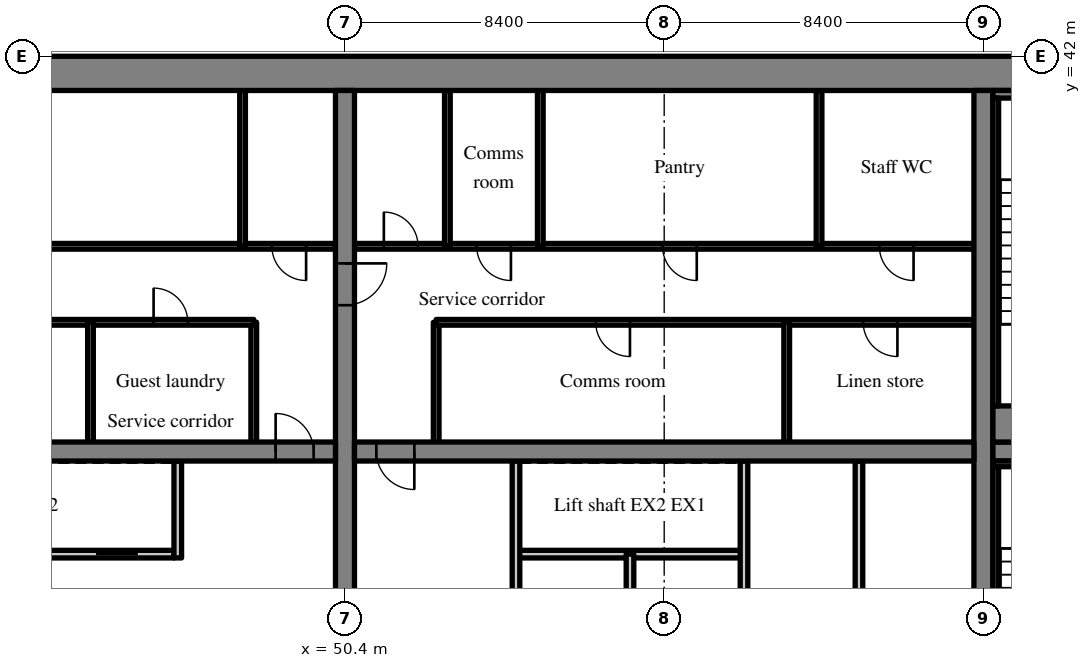
"""IFC4 building model, lengths in metres.
Left out: names, types, materials, properties, quantities, classifications, styles, units other than length and angle.
Written with IfcOpenShell. Run it as: python <this file> out.ifc"""

import sys

from ifc_helpers import new_model, si_unit, direction, frame, frame_2d, origin, place, context, subcontext, project, spatial, rectangle, extrude, source, transform, mapped, element, fill, save


model = new_model("IFC4")
c1 = context("Model", 3, precision=1e-05, world=origin(), true_north=direction((0.0, 1.0)))
c2 = subcontext(c1, "Body", "Model", "MODEL_VIEW")
j1 = project(units=[si_unit("LENGTHUNIT", "METRE"), si_unit("PLANEANGLEUNIT", "RADIAN")], contexts=[c1])
p1 = place(None, origin())
s1 = spatial("IfcSite", under=j1, at=p1, CompositionType="ELEMENT")
p2 = place(p1, origin())
s2 = spatial("IfcBuilding", under=s1, at=p2, CompositionType="ELEMENT")
p3 = place(p2, frame((0.0, 0.0, 114.2)))
s3 = spatial("IfcBuildingStorey", under=s2, at=p3, CompositionType="ELEMENT", Elevation=114.2)
m1 = source(origin(), c2, "Body", "SweptSolid", [
    extrude(rectangle(XDim=50.4, YDim=0.9, at=frame_2d((25.2, 0.0))), origin(), (0.0, 0.0, 1.0), 3.52),
])
p4 = place(p3, frame((25.2, 41.55, 0.0), z_axis=(0.0, 0.0, 1.0), x_axis=(1.0, 0.0, 0.0)))
e1 = element("IfcWall", 1, at=p4, inside=s3, PredefinedType="SHEAR", context=c2, shape_type="MappedRepresentation", body=[
    mapped(m1, transform((0.0, 0.0, 0.0), scale=1.0)),
])
m2 = source(origin(), c2, "Body", "SweptSolid", [
    extrude(rectangle(XDim=18.2, YDim=0.5, at=frame_2d((9.1, 0.0))), origin(), (0.0, 0.0, 1.0), 3.52),
])
p5 = place(p3, frame((50.4, 22.9, 0.0), z_axis=(0.0, 0.0, 1.0), x_axis=(0.0, 1.0, 0.0)))
e2 = element("IfcWall", 2, at=p5, inside=s3, PredefinedType="SHEAR", context=c2, shape_type="MappedRepresentation", body=[
    mapped(m2, transform((0.0, 0.0, 0.0), scale=1.0)),
])
m3 = source(origin(), c2, "Body", "SweptSolid", [
    extrude(rectangle(XDim=1.1, YDim=2.1, at=frame_2d((0.55, 1.05))), frame((0.0, 0.26, 0.0), z_axis=(0.0, -1.0, 0.0), x_axis=(1.0, 0.0, 0.0)), (0.0, 0.0, 1.0), 0.52),
])
p6 = place(p5, frame((12.55, 0.0, 0.0)))
e3 = element("IfcOpeningElement", 3, at=p6, cuts=e2, PredefinedType="OPENING", context=c2, shape_type="MappedRepresentation", body=[
    mapped(m3, transform((0.0, 0.0, 0.0), scale=1.0)),
])
p7 = place(p3, frame((67.2, 22.9, 0.0), z_axis=(0.0, 0.0, 1.0), x_axis=(0.0, 1.0, 0.0)))
e4 = element("IfcWall", 4, at=p7, inside=s3, PredefinedType="SHEAR", context=c2, shape_type="MappedRepresentation", body=[
    mapped(m2, transform((0.0, 0.0, 0.0), scale=1.0)),
])
m4 = source(origin(), c2, "Body", "SweptSolid", [
    extrude(rectangle(XDim=16.3, YDim=0.5, at=frame_2d((8.15, 0.0))), origin(), (0.0, 0.0, 1.0), 3.52),
])
p8 = place(p3, frame((33.85, 31.6, 0.0), z_axis=(0.0, 0.0, 1.0), x_axis=(1.0, 0.0, 0.0)))
e5 = element("IfcWall", 5, at=p8, inside=s3, PredefinedType="SHEAR", context=c2, shape_type="MappedRepresentation", body=[
    mapped(m4, transform((0.0, 0.0, 0.0), scale=1.0)),
])
m5 = source(origin(), c2, "Body", "SweptSolid", [
    extrude(rectangle(XDim=1.0, YDim=2.1, at=frame_2d((0.5, 1.05))), frame((0.0, 0.26, 0.0), z_axis=(0.0, -1.0, 0.0), x_axis=(1.0, 0.0, 0.0)), (0.0, 0.0, 1.0), 0.52),
])
p9 = place(p8, frame((14.725, 0.0, 0.0)))
e6 = element("IfcOpeningElement", 6, at=p9, cuts=e5, PredefinedType="OPENING", context=c2, shape_type="MappedRepresentation", body=[
    mapped(m5, transform((0.0, 0.0, 0.0), scale=1.0)),
])
m6 = source(origin(), c2, "Body", "SweptSolid", [
    extrude(rectangle(XDim=16.3, YDim=0.5, at=frame_2d((8.15, 0.0))), origin(), (0.0, 0.0, 1.0), 3.52),
])
p10 = place(p3, frame((50.65, 31.6, 0.0), z_axis=(0.0, 0.0, 1.0), x_axis=(1.0, 0.0, 0.0)))
e7 = element("IfcWall", 7, at=p10, inside=s3, PredefinedType="SHEAR", context=c2, shape_type="MappedRepresentation", body=[
    mapped(m6, transform((0.0, 0.0, 0.0), scale=1.0)),
])
p11 = place(p10, frame((0.575, 0.0, 0.0)))
e8 = element("IfcOpeningElement", 8, at=p11, cuts=e7, PredefinedType="OPENING", context=c2, shape_type="MappedRepresentation", body=[
    mapped(m5, transform((0.0, 0.0, 0.0), scale=1.0)),
])
m7 = source(origin(), c2, "Body", "SweptSolid", [
    extrude(rectangle(XDim=7.25, YDim=0.5, at=frame_2d((3.625, 0.0))), origin(), (0.0, 0.0, 1.0), 3.52),
])
p12 = place(p3, frame((67.45, 31.6, 0.0), z_axis=(0.0, 0.0, 1.0), x_axis=(1.0, 0.0, 0.0)))
e9 = element("IfcWall", 9, at=p12, inside=s3, PredefinedType="SHEAR", context=c2, shape_type="MappedRepresentation", body=[
    mapped(m7, transform((0.0, 0.0, 0.0), scale=1.0)),
])
p13 = place(p12, frame((5.575, 0.0, 0.0)))
e10 = element("IfcOpeningElement", 10, at=p13, cuts=e9, PredefinedType="OPENING", context=c2, shape_type="MappedRepresentation", body=[
    mapped(m3, transform((0.0, 0.0, 0.0), scale=1.0)),
])
m8 = source(origin(), c2, "Body", "SweptSolid", [
    extrude(rectangle(XDim=12.05, YDim=0.2, at=frame_2d((6.025, 0.0))), origin(), (0.0, 0.0, 1.0), 3.52),
])
p14 = place(p3, frame((33.85, 28.9, 0.0), z_axis=(0.0, 0.0, 1.0), x_axis=(1.0, 0.0, 0.0)))
e11 = element("IfcWall", 11, at=p14, inside=s3, PredefinedType="SOLIDWALL", context=c2, shape_type="MappedRepresentation", body=[
    mapped(m8, transform((0.0, 0.0, 0.0), scale=1.0)),
])
m9 = source(origin(), c2, "Body", "SweptSolid", [
    extrude(rectangle(XDim=1.1, YDim=2.1, at=frame_2d((0.55, 1.05))), frame((0.0, 0.11, 0.0), z_axis=(0.0, -1.0, 0.0), x_axis=(1.0, 0.0, 0.0)), (0.0, 0.0, 1.0), 0.22),
])
p15 = place(p14, frame((1.0, 0.0, 0.0)))
e12 = element("IfcOpeningElement", 12, at=p15, cuts=e11, PredefinedType="OPENING", context=c2, shape_type="MappedRepresentation", body=[
    mapped(m9, transform((0.0, 0.0, 0.0), scale=1.0)),
])
p16 = place(p14, frame((4.0, 0.0, 0.0)))
e13 = element("IfcOpeningElement", 13, at=p16, cuts=e11, PredefinedType="OPENING", context=c2, shape_type="MappedRepresentation", body=[
    mapped(m9, transform((0.0, 0.0, 0.0), scale=1.0)),
])
p17 = place(p14, frame((7.0, 0.0, 0.0)))
e14 = element("IfcOpeningElement", 14, at=p17, cuts=e11, PredefinedType="OPENING", context=c2, shape_type="MappedRepresentation", body=[
    mapped(m9, transform((0.0, 0.0, 0.0), scale=1.0)),
])
p18 = place(p14, frame((10.0, 0.0, 0.0)))
e15 = element("IfcOpeningElement", 15, at=p18, cuts=e11, PredefinedType="OPENING", context=c2, shape_type="MappedRepresentation", body=[
    mapped(m9, transform((0.0, 0.0, 0.0), scale=1.0)),
])
m10 = source(origin(), c2, "Body", "SweptSolid", [
    extrude(rectangle(XDim=2.55, YDim=0.2, at=frame_2d((1.275, 0.0))), origin(), (0.0, 0.0, 1.0), 3.52),
])
p19 = place(p3, frame((46.0, 28.8, 0.0), z_axis=(0.0, 0.0, 1.0), x_axis=(0.0, 1.0, 0.0)))
e16 = element("IfcWall", 16, at=p19, inside=s3, PredefinedType="SOLIDWALL", context=c2, shape_type="MappedRepresentation", body=[
    mapped(m10, transform((0.0, 0.0, 0.0), scale=1.0)),
])
m11 = source(origin(), c2, "Body", "SweptSolid", [
    extrude(rectangle(XDim=3.15, YDim=0.15, at=frame_2d((1.575, 0.0))), origin(), (0.0, 0.0, 1.0), 3.52),
])
p20 = place(p3, frame((48.0, 31.85, 0.0), z_axis=(0.0, 0.0, 1.0), x_axis=(0.0, 1.0, 0.0)))
e17 = element("IfcWall", 17, at=p20, inside=s3, PredefinedType="PARTITIONING", context=c2, shape_type="MappedRepresentation", body=[
    mapped(m11, transform((0.0, 0.0, 0.0), scale=1.0)),
])
m12 = source(origin(), c2, "Body", "SweptSolid", [
    extrude(rectangle(XDim=14.15, YDim=0.15, at=frame_2d((7.075, 0.0))), origin(), (0.0, 0.0, 1.0), 3.52),
])
p21 = place(p3, frame((33.85, 35.0, 0.0), z_axis=(0.0, 0.0, 1.0), x_axis=(1.0, 0.0, 0.0)))
e18 = element("IfcWall", 18, at=p21, inside=s3, PredefinedType="PARTITIONING", context=c2, shape_type="MappedRepresentation", body=[
    mapped(m12, transform((0.0, 0.0, 0.0), scale=1.0)),
])
m13 = source(origin(), c2, "Body", "SweptSolid", [
    extrude(rectangle(XDim=0.9, YDim=2.1, at=frame_2d((0.45, 1.05))), frame((0.0, 0.085, 0.0), z_axis=(0.0, -1.0, 0.0), x_axis=(1.0, 0.0, 0.0)), (0.0, 0.0, 1.0), 0.17),
])
p22 = place(p21, frame((0.958, 0.0, 0.0)))
e19 = element("IfcOpeningElement", 19, at=p22, cuts=e18, PredefinedType="OPENING", context=c2, shape_type="MappedRepresentation", body=[
    mapped(m13, transform((0.0, 0.0, 0.0), scale=1.0)),
])
p23 = place(p21, frame((5.884, 0.0, 0.0)))
e20 = element("IfcOpeningElement", 20, at=p23, cuts=e18, PredefinedType="OPENING", context=c2, shape_type="MappedRepresentation", body=[
    mapped(m13, transform((0.0, 0.0, 0.0), scale=1.0)),
])
p24 = place(p21, frame((11.514, 0.0, 0.0)))
e21 = element("IfcOpeningElement", 21, at=p24, cuts=e18, PredefinedType="OPENING", context=c2, shape_type="MappedRepresentation", body=[
    mapped(m13, transform((0.0, 0.0, 0.0), scale=1.0)),
])
m14 = source(origin(), c2, "Body", "SweptSolid", [
    extrude(rectangle(XDim=16.3, YDim=0.15, at=frame_2d((8.15, 0.0))), origin(), (0.0, 0.0, 1.0), 3.52),
])
p25 = place(p3, frame((33.85, 37.0, 0.0), z_axis=(0.0, 0.0, 1.0), x_axis=(1.0, 0.0, 0.0)))
e22 = element("IfcWall", 22, at=p25, inside=s3, PredefinedType="PARTITIONING", context=c2, shape_type="MappedRepresentation", body=[
    mapped(m14, transform((0.0, 0.0, 0.0), scale=1.0)),
])
p26 = place(p25, frame((6.478, 0.0, 0.0)))
e23 = element("IfcOpeningElement", 23, at=p26, cuts=e22, PredefinedType="OPENING", context=c2, shape_type="MappedRepresentation", body=[
    mapped(m13, transform((0.0, 0.0, 0.0), scale=1.0)),
])
p27 = place(p25, frame((14.627, 0.0, 0.0)))
e24 = element("IfcOpeningElement", 24, at=p27, cuts=e22, PredefinedType="OPENING", context=c2, shape_type="MappedRepresentation", body=[
    mapped(m13, transform((0.0, 0.0, 0.0), scale=1.0)),
])
p28 = place(p3, frame((43.703, 31.85, 0.0), z_axis=(0.0, 0.0, 1.0), x_axis=(0.0, 1.0, 0.0)))
e25 = element("IfcWall", 25, at=p28, inside=s3, PredefinedType="PARTITIONING", context=c2, shape_type="MappedRepresentation", body=[
    mapped(m11, transform((0.0, 0.0, 0.0), scale=1.0)),
])
m15 = source(origin(), c2, "Body", "SweptSolid", [
    extrude(rectangle(XDim=4.1, YDim=0.15, at=frame_2d((2.05, 0.0))), origin(), (0.0, 0.0, 1.0), 3.52),
])
p29 = place(p3, frame((47.705, 37.0, 0.0), z_axis=(0.0, 0.0, 1.0), x_axis=(0.0, 1.0, 0.0)))
e26 = element("IfcWall", 26, at=p29, inside=s3, PredefinedType="PARTITIONING", context=c2, shape_type="MappedRepresentation", body=[
    mapped(m15, transform((0.0, 0.0, 0.0), scale=1.0)),
])
m16 = source(origin(), c2, "Body", "SweptSolid", [
    extrude(rectangle(XDim=6.0, YDim=0.2, at=frame_2d((3.0, 0.0))), origin(), (0.0, 0.0, 1.0), 3.52),
])
p30 = place(p3, frame((60.9, 28.9, 0.0), z_axis=(0.0, 0.0, 1.0), x_axis=(-1.0, 0.0, 0.0)))
e27 = element("IfcWall", 27, at=p30, inside=s3, PredefinedType="SOLIDWALL", context=c2, shape_type="MappedRepresentation", body=[
    mapped(m16, transform((0.0, 0.0, 0.0), scale=1.0)),
])
m17 = source(origin(), c2, "Body", "SweptSolid", [
    extrude(rectangle(XDim=8.45, YDim=0.2, at=frame_2d((4.225, 0.0))), origin(), (0.0, 0.0, 1.0), 3.52),
])
for number, where, z_axis, x_axis in (
    (28, (54.9, 22.9, 0.0), (0.0, 0.0, 1.0), (0.0, 1.0, 0.0)),
    (29, (60.9, 22.9, 0.0), (0.0, 0.0, 1.0), (0.0, 1.0, 0.0)),
):
    element("IfcWall", number, at=place(p3, frame(where, z_axis=z_axis, x_axis=x_axis)), inside=s3, PredefinedType="PARTITIONING", context=c2, shape_type="MappedRepresentation", body=[
        mapped(m17, transform((0.0, 0.0, 0.0), scale=1.0)),
    ])
p31 = place(p3, frame((57.9, 22.9, 0.0), z_axis=(0.0, 0.0, 1.0), x_axis=(0.0, 1.0, 0.0)))
e30 = element("IfcWall", 30, at=p31, inside=s3, PredefinedType="PARTITIONING", context=c2, shape_type="MappedRepresentation", body=[
    mapped(m16, transform((0.0, 0.0, 0.0), scale=1.0)),
])
p32 = place(p3, frame((63.925, 22.9, 0.0), z_axis=(0.0, 0.0, 1.0), x_axis=(0.0, 1.0, 0.0)))
e31 = element("IfcWall", 31, at=p32, inside=s3, PredefinedType="PARTITIONING", context=c2, shape_type="MappedRepresentation", body=[
    mapped(m17, transform((0.0, 0.0, 0.0), scale=1.0)),
])
p33 = place(p3, frame((52.8, 31.85, 0.0), z_axis=(0.0, 0.0, 1.0), x_axis=(0.0, 1.0, 0.0)))
e32 = element("IfcWall", 32, at=p33, inside=s3, PredefinedType="PARTITIONING", context=c2, shape_type="MappedRepresentation", body=[
    mapped(m11, transform((0.0, 0.0, 0.0), scale=1.0)),
])
p34 = place(p3, frame((66.95, 35.0, 0.0), z_axis=(0.0, 0.0, 1.0), x_axis=(-1.0, 0.0, 0.0)))
e33 = element("IfcWall", 33, at=p34, inside=s3, PredefinedType="PARTITIONING", context=c2, shape_type="MappedRepresentation", body=[
    mapped(m12, transform((0.0, 0.0, 0.0), scale=1.0)),
])
p35 = place(p34, frame((2.013, 0.0, 0.0)))
e34 = element("IfcOpeningElement", 34, at=p35, cuts=e33, PredefinedType="OPENING", context=c2, shape_type="MappedRepresentation", body=[
    mapped(m13, transform((0.0, 0.0, 0.0), scale=1.0)),
])
p36 = place(p34, frame((9.051, 0.0, 0.0)))
e35 = element("IfcOpeningElement", 35, at=p36, cuts=e33, PredefinedType="OPENING", context=c2, shape_type="MappedRepresentation", body=[
    mapped(m13, transform((0.0, 0.0, 0.0), scale=1.0)),
])
m18 = source(origin(), c2, "Body", "SweptSolid", [
    extrude(rectangle(XDim=16.3, YDim=0.15, at=frame_2d((8.15, 0.0))), origin(), (0.0, 0.0, 1.0), 3.52),
])
p37 = place(p3, frame((66.95, 37.0, 0.0), z_axis=(0.0, 0.0, 1.0), x_axis=(-1.0, 0.0, 0.0)))
e36 = element("IfcWall", 36, at=p37, inside=s3, PredefinedType="PARTITIONING", context=c2, shape_type="MappedRepresentation", body=[
    mapped(m18, transform((0.0, 0.0, 0.0), scale=1.0)),
])
p38 = place(p37, frame((1.588, 0.0, 0.0)))
e37 = element("IfcOpeningElement", 37, at=p38, cuts=e36, PredefinedType="OPENING", context=c2, shape_type="MappedRepresentation", body=[
    mapped(m13, transform((0.0, 0.0, 0.0), scale=1.0)),
])
p39 = place(p37, frame((7.293, 0.0, 0.0)))
e38 = element("IfcOpeningElement", 38, at=p39, cuts=e36, PredefinedType="OPENING", context=c2, shape_type="MappedRepresentation", body=[
    mapped(m13, transform((0.0, 0.0, 0.0), scale=1.0)),
])
p40 = place(p37, frame((12.183, 0.0, 0.0)))
e39 = element("IfcOpeningElement", 39, at=p40, cuts=e36, PredefinedType="OPENING", context=c2, shape_type="MappedRepresentation", body=[
    mapped(m13, transform((0.0, 0.0, 0.0), scale=1.0)),
])
p41 = place(p37, frame((14.627, 0.0, 0.0)))
e40 = element("IfcOpeningElement", 40, at=p41, cuts=e36, PredefinedType="OPENING", context=c2, shape_type="MappedRepresentation", body=[
    mapped(m13, transform((0.0, 0.0, 0.0), scale=1.0)),
])
p42 = place(p3, frame((62.024, 31.85, 0.0), z_axis=(0.0, 0.0, 1.0), x_axis=(0.0, 1.0, 0.0)))
e41 = element("IfcWall", 41, at=p42, inside=s3, PredefinedType="PARTITIONING", context=c2, shape_type="MappedRepresentation", body=[
    mapped(m11, transform((0.0, 0.0, 0.0), scale=1.0)),
])
for number, where, z_axis, x_axis in (
    (42, (62.875, 37.0, 0.0), (0.0, 0.0, 1.0), (0.0, 1.0, 0.0)),
    (43, (55.54, 37.0, 0.0), (0.0, 0.0, 1.0), (0.0, 1.0, 0.0)),
    (44, (53.095, 37.0, 0.0), (0.0, 0.0, 1.0), (0.0, 1.0, 0.0)),
):
    element("IfcWall", number, at=place(p3, frame(where, z_axis=z_axis, x_axis=x_axis)), inside=s3, PredefinedType="PARTITIONING", context=c2, shape_type="MappedRepresentation", body=[
        mapped(m15, transform((0.0, 0.0, 0.0), scale=1.0)),
    ])
m19 = source(origin(), c2, "Body", "SweptSolid", [
    extrude(rectangle(XDim=4.8, YDim=0.15, at=frame_2d((2.4, 0.0))), origin(), (0.0, 0.0, 1.0), 3.52),
])
p43 = place(p3, frame((67.45, 31.275, 0.0), z_axis=(0.0, 0.0, 1.0), x_axis=(1.0, 0.0, 0.0)))
e45 = element("IfcWall", 45, at=p43, inside=s3, PredefinedType="SOLIDWALL", context=c2, shape_type="MappedRepresentation", body=[
    mapped(m19, transform((0.0, 0.0, 0.0), scale=1.0)),
])
m20 = source(origin(), c2, "Body", "SweptSolid", [
    extrude(rectangle(XDim=8.1, YDim=0.15, at=frame_2d((4.05, 0.0))), origin(), (0.0, 0.0, 1.0), 3.52),
])
p44 = place(p3, frame((67.525, 23.1, 0.0), z_axis=(0.0, 0.0, 1.0), x_axis=(0.0, 1.0, 0.0)))
e46 = element("IfcWall", 46, at=p44, inside=s3, PredefinedType="SOLIDWALL", context=c2, shape_type="MappedRepresentation", body=[
    mapped(m20, transform((0.0, 0.0, 0.0), scale=1.0)),
])
m21 = source(origin(), c2, "Body", "SweptSolid", [
    extrude(rectangle(XDim=4.8, YDim=0.2, at=frame_2d((2.4, 0.0))), origin(), (0.0, 0.0, 1.0), 3.52),
])
p45 = place(p3, frame((67.45, 41.0, 0.0), z_axis=(0.0, 0.0, 1.0), x_axis=(1.0, 0.0, 0.0)))
e47 = element("IfcWall", 47, at=p45, inside=s3, PredefinedType="SOLIDWALL", context=c2, shape_type="MappedRepresentation", body=[
    mapped(m21, transform((0.0, 0.0, 0.0), scale=1.0)),
])
m22 = source(origin(), c2, "Body", "SweptSolid", [
    extrude(rectangle(XDim=4.8, YDim=0.95, at=frame_2d((2.4, 0.0))), origin(), (0.0, 0.0, 1.0), 3.52),
])
p46 = place(p3, frame((67.45, 32.325, 0.0), z_axis=(0.0, 0.0, 1.0), x_axis=(1.0, 0.0, 0.0)))
e48 = element("IfcWall", 48, at=p46, inside=s3, PredefinedType="SOLIDWALL", context=c2, shape_type="MappedRepresentation", body=[
    mapped(m22, transform((0.0, 0.0, 0.0), scale=1.0)),
])
p47 = place(p3, frame((67.525, 32.8, 0.0), z_axis=(0.0, 0.0, 1.0), x_axis=(0.0, 1.0, 0.0)))
e49 = element("IfcWall", 49, at=p47, inside=s3, PredefinedType="SOLIDWALL", context=c2, shape_type="MappedRepresentation", body=[
    mapped(m20, transform((0.0, 0.0, 0.0), scale=1.0)),
])
m23 = source(origin(), c2, "Body", "SweptSolid", [
    extrude(rectangle(XDim=1.0, YDim=2.1, at=frame_2d((0.5, 1.05))), frame((0.0, 0.025, 0.0), z_axis=(0.0, -1.0, 0.0), x_axis=(1.0, 0.0, 0.0)), (0.0, 0.0, 1.0), 0.05),
])
p48 = place(p9, origin())
e50 = element("IfcDoor", 50, at=p48, inside=s3, OperationType="SINGLE_SWING_LEFT", PredefinedType="DOOR", context=c2, shape_type="MappedRepresentation", body=[
    mapped(m23, transform((0.0, 0.0, 0.0), scale=1.0)),
])
fill(e6, e50)
m24 = source(origin(), c2, "Body", "SweptSolid", [
    extrude(rectangle(XDim=1.1, YDim=2.1, at=frame_2d((0.55, 1.05))), frame((0.0, 0.025, 0.0), z_axis=(0.0, -1.0, 0.0), x_axis=(1.0, 0.0, 0.0)), (0.0, 0.0, 1.0), 0.05),
])
p49 = place(p18, origin())
e51 = element("IfcDoor", 51, at=p49, inside=s3, OperationType="SLIDING_TO_RIGHT", PredefinedType="DOOR", context=c2, shape_type="MappedRepresentation", body=[
    mapped(m24, transform((0.0, 0.0, 0.0), scale=1.0)),
])
fill(e15, e51)
m25 = source(origin(), c2, "Body", "SweptSolid", [
    extrude(rectangle(XDim=0.9, YDim=2.1, at=frame_2d((0.45, 1.05))), frame((0.0, 0.025, 0.0), z_axis=(0.0, -1.0, 0.0), x_axis=(1.0, 0.0, 0.0)), (0.0, 0.0, 1.0), 0.05),
])
p50 = place(p24, origin())
e52 = element("IfcDoor", 52, at=p50, inside=s3, OperationType="SINGLE_SWING_LEFT", PredefinedType="DOOR", context=c2, shape_type="MappedRepresentation", body=[
    mapped(m25, transform((0.0, 0.0, 0.0), scale=1.0)),
])
fill(e21, e52)
p51 = place(p27, origin())
e53 = element("IfcDoor", 53, at=p51, inside=s3, OperationType="SINGLE_SWING_RIGHT", PredefinedType="DOOR", context=c2, shape_type="MappedRepresentation", body=[
    mapped(m25, transform((0.0, 0.0, 0.0), scale=1.0)),
])
fill(e24, e53)
p52 = place(p11, origin())
e54 = element("IfcDoor", 54, at=p52, inside=s3, OperationType="SINGLE_SWING_RIGHT", PredefinedType="DOOR", context=c2, shape_type="MappedRepresentation", body=[
    mapped(m23, transform((0.0, 0.0, 0.0), scale=1.0)),
])
fill(e8, e54)
p53 = place(p35, origin())
e55 = element("IfcDoor", 55, at=p53, inside=s3, OperationType="SINGLE_SWING_LEFT", PredefinedType="DOOR", context=c2, shape_type="MappedRepresentation", body=[
    mapped(m25, transform((0.0, 0.0, 0.0), scale=1.0)),
])
fill(e34, e55)
p54 = place(p36, origin())
e56 = element("IfcDoor", 56, at=p54, inside=s3, OperationType="SINGLE_SWING_LEFT", PredefinedType="DOOR", context=c2, shape_type="MappedRepresentation", body=[
    mapped(m25, transform((0.0, 0.0, 0.0), scale=1.0)),
])
fill(e35, e56)
p55 = place(p38, origin())
e57 = element("IfcDoor", 57, at=p55, inside=s3, OperationType="SINGLE_SWING_LEFT", PredefinedType="DOOR", context=c2, shape_type="MappedRepresentation", body=[
    mapped(m25, transform((0.0, 0.0, 0.0), scale=1.0)),
])
fill(e37, e57)
p56 = place(p39, origin())
e58 = element("IfcDoor", 58, at=p56, inside=s3, OperationType="SINGLE_SWING_LEFT", PredefinedType="DOOR", context=c2, shape_type="MappedRepresentation", body=[
    mapped(m25, transform((0.0, 0.0, 0.0), scale=1.0)),
])
fill(e38, e58)
p57 = place(p40, origin())
e59 = element("IfcDoor", 59, at=p57, inside=s3, OperationType="SINGLE_SWING_LEFT", PredefinedType="DOOR", context=c2, shape_type="MappedRepresentation", body=[
    mapped(m25, transform((0.0, 0.0, 0.0), scale=1.0)),
])
fill(e39, e59)
p58 = place(p41, origin())
e60 = element("IfcDoor", 60, at=p58, inside=s3, OperationType="SINGLE_SWING_RIGHT", PredefinedType="DOOR", context=c2, shape_type="MappedRepresentation", body=[
    mapped(m25, transform((0.0, 0.0, 0.0), scale=1.0)),
])
fill(e40, e60)
p59 = place(p6, origin())
e61 = element("IfcDoor", 61, at=p59, inside=s3, OperationType="SINGLE_SWING_RIGHT", PredefinedType="DOOR", context=c2, shape_type="MappedRepresentation", body=[
    mapped(m24, transform((0.0, 0.0, 0.0), scale=1.0)),
])
fill(e3, e61)
save(model, sys.argv[1])
